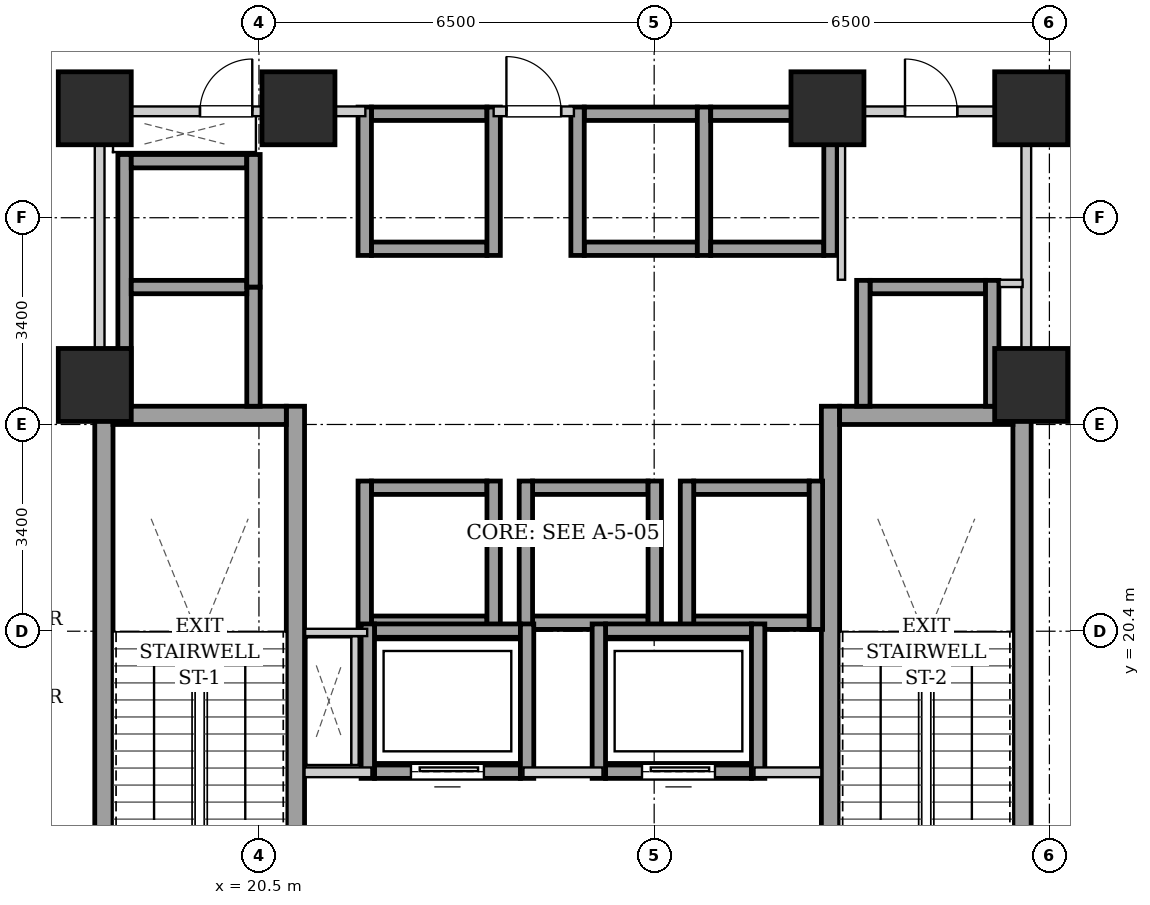
"""IFC4 building model, lengths in metres.
Left out: names, types, materials, properties, quantities, classifications, styles, units other than length and angle.
Written with IfcOpenShell. Run it as: python <this file> out.ifc"""

import sys

from ifc_helpers import new_model, si_unit, direction, frame, frame_2d, origin, origin_2d, place, context, subcontext, project, spatial, rectangle, extrude, element, fill, save


model = new_model("IFC4")
c1 = context("Model", 3, precision=1e-05, world=origin(), true_north=direction((0.0, 1.0)))
c2 = subcontext(c1, "Body", "Model", "MODEL_VIEW")
j1 = project(units=[si_unit("LENGTHUNIT", "METRE"), si_unit("PLANEANGLEUNIT", "RADIAN")], contexts=[c1])
p1 = place(None, origin())
s1 = spatial("IfcSite", under=j1, at=p1, CompositionType="ELEMENT")
p2 = place(p1, origin())
s2 = spatial("IfcBuilding", under=s1, at=p2, CompositionType="ELEMENT")
p3 = place(p2, frame((0.0, 0.0, 20.8)))
s3 = spatial("IfcBuildingStorey", under=s2, at=p3, CompositionType="ELEMENT", Elevation=20.8)
for number, where, z_axis, x_axis in (
    (1, (17.8, 29.0, 0.0), (0.0, 0.0, 1.0), (1.0, 0.0, 0.0)),
    (2, (21.15, 29.0, 0.0), (0.0, 0.0, 1.0), (1.0, 0.0, 0.0)),
    (3, (29.85, 29.0, 0.0), (0.0, 0.0, 1.0), (1.0, 0.0, 0.0)),
    (4, (33.2, 29.0, 0.0), (0.0, 0.0, 1.0), (1.0, 0.0, 0.0)),
    (5, (17.8, 24.45, 0.0), (0.0, 0.0, 1.0), (1.0, 0.0, 0.0)),
    (6, (33.2, 24.45, 0.0), (0.0, 0.0, 1.0), (1.0, 0.0, 0.0)),
):
    element("IfcColumn", number, at=place(p3, frame(where, z_axis=z_axis, x_axis=x_axis)), inside=s3, PredefinedType="COLUMN", context=c2, shape_type="SweptSolid", body=[
        extrude(rectangle(XDim=1.2, YDim=1.2, at=origin_2d()), origin(), (0.0, 0.0, 1.0), 5.0),
    ])
for number, where, z_axis, x_axis in (
    (7, (17.95, 15.1, 0.0), (0.0, 0.0, 1.0), (0.0, 1.0, 0.0)),
    (8, (21.1, 15.1, 0.0), (0.0, 0.0, 1.0), (0.0, 1.0, 0.0)),
):
    element("IfcWall", number, at=place(p3, frame(where, z_axis=z_axis, x_axis=x_axis)), inside=s3, PredefinedType="SHEAR", context=c2, shape_type="SweptSolid", body=[
        extrude(rectangle(XDim=9.0, YDim=0.3, at=frame_2d((4.5, 0.0))), origin(), (0.0, 0.0, 1.0), 4.74),
    ])
p4 = place(p3, frame((18.1, 23.95, 0.0), z_axis=(0.0, 0.0, 1.0), x_axis=(1.0, 0.0, 0.0)))
e9 = element("IfcWall", 9, at=p4, inside=s3, PredefinedType="SHEAR", context=c2, shape_type="SweptSolid", body=[
    extrude(rectangle(XDim=2.85, YDim=0.3, at=frame_2d((1.425, 0.0))), origin(), (0.0, 0.0, 1.0), 4.74),
])
for number, where, z_axis, x_axis in (
    (10, (29.9, 15.1, 0.0), (0.0, 0.0, 1.0), (0.0, 1.0, 0.0)),
    (11, (33.05, 15.1, 0.0), (0.0, 0.0, 1.0), (0.0, 1.0, 0.0)),
):
    element("IfcWall", number, at=place(p3, frame(where, z_axis=z_axis, x_axis=x_axis)), inside=s3, PredefinedType="SHEAR", context=c2, shape_type="SweptSolid", body=[
        extrude(rectangle(XDim=9.0, YDim=0.3, at=frame_2d((4.5, 0.0))), origin(), (0.0, 0.0, 1.0), 4.74),
    ])
p5 = place(p3, frame((30.05, 23.95, 0.0), z_axis=(0.0, 0.0, 1.0), x_axis=(1.0, 0.0, 0.0)))
e12 = element("IfcWall", 12, at=p5, inside=s3, PredefinedType="SHEAR", context=c2, shape_type="SweptSolid", body=[
    extrude(rectangle(XDim=2.85, YDim=0.3, at=frame_2d((1.425, 0.0))), origin(), (0.0, 0.0, 1.0), 4.74),
])
for number, where, z_axis, x_axis in (
    (13, (22.35, 26.69, 0.0), (0.0, 0.0, 1.0), (1.0, 0.0, 0.0)),
    (14, (22.35, 28.91, 0.0), (0.0, 0.0, 1.0), (1.0, 0.0, 0.0)),
):
    element("IfcWall", number, at=place(p3, frame(where, z_axis=z_axis, x_axis=x_axis)), inside=s3, PredefinedType="SHEAR", context=c2, shape_type="SweptSolid", body=[
        extrude(rectangle(XDim=1.9, YDim=0.22, at=frame_2d((0.95, 0.0))), origin(), (0.0, 0.0, 1.0), 4.74),
    ])
for number, where, z_axis, x_axis in (
    (15, (22.24, 26.58, 0.0), (0.0, 0.0, 1.0), (0.0, 1.0, 0.0)),
    (16, (24.36, 26.58, 0.0), (0.0, 0.0, 1.0), (0.0, 1.0, 0.0)),
):
    element("IfcWall", number, at=place(p3, frame(where, z_axis=z_axis, x_axis=x_axis)), inside=s3, PredefinedType="SHEAR", context=c2, shape_type="SweptSolid", body=[
        extrude(rectangle(XDim=2.44, YDim=0.22, at=frame_2d((1.22, 0.0))), origin(), (0.0, 0.0, 1.0), 4.74),
    ])
for number, where, z_axis, x_axis in (
    (17, (25.85, 26.69, 0.0), (0.0, 0.0, 1.0), (1.0, 0.0, 0.0)),
    (18, (25.85, 28.91, 0.0), (0.0, 0.0, 1.0), (1.0, 0.0, 0.0)),
):
    element("IfcWall", number, at=place(p3, frame(where, z_axis=z_axis, x_axis=x_axis)), inside=s3, PredefinedType="SHEAR", context=c2, shape_type="SweptSolid", body=[
        extrude(rectangle(XDim=1.86, YDim=0.22, at=frame_2d((0.93, 0.0))), origin(), (0.0, 0.0, 1.0), 4.74),
    ])
for number, where, z_axis, x_axis in (
    (19, (25.74, 26.58, 0.0), (0.0, 0.0, 1.0), (0.0, 1.0, 0.0)),
    (20, (27.82, 26.58, 0.0), (0.0, 0.0, 1.0), (0.0, 1.0, 0.0)),
):
    element("IfcWall", number, at=place(p3, frame(where, z_axis=z_axis, x_axis=x_axis)), inside=s3, PredefinedType="SHEAR", context=c2, shape_type="SweptSolid", body=[
        extrude(rectangle(XDim=2.44, YDim=0.22, at=frame_2d((1.22, 0.0))), origin(), (0.0, 0.0, 1.0), 4.74),
    ])
for number, where, z_axis, x_axis in (
    (21, (27.93, 26.69, 0.0), (0.0, 0.0, 1.0), (1.0, 0.0, 0.0)),
    (22, (27.93, 28.91, 0.0), (0.0, 0.0, 1.0), (1.0, 0.0, 0.0)),
):
    element("IfcWall", number, at=place(p3, frame(where, z_axis=z_axis, x_axis=x_axis)), inside=s3, PredefinedType="SHEAR", context=c2, shape_type="SweptSolid", body=[
        extrude(rectangle(XDim=1.86, YDim=0.22, at=frame_2d((0.93, 0.0))), origin(), (0.0, 0.0, 1.0), 4.74),
    ])
p6 = place(p3, frame((29.9, 26.58, 0.0), z_axis=(0.0, 0.0, 1.0), x_axis=(0.0, 1.0, 0.0)))
e23 = element("IfcWall", 23, at=p6, inside=s3, PredefinedType="SHEAR", context=c2, shape_type="SweptSolid", body=[
    extrude(rectangle(XDim=2.44, YDim=0.22, at=frame_2d((1.22, 0.0))), origin(), (0.0, 0.0, 1.0), 4.74),
])
for number, where, z_axis, x_axis in (
    (24, (22.35, 20.54, 0.0), (0.0, 0.0, 1.0), (1.0, 0.0, 0.0)),
    (25, (22.35, 22.76, 0.0), (0.0, 0.0, 1.0), (1.0, 0.0, 0.0)),
):
    element("IfcWall", number, at=place(p3, frame(where, z_axis=z_axis, x_axis=x_axis)), inside=s3, PredefinedType="SHEAR", context=c2, shape_type="SweptSolid", body=[
        extrude(rectangle(XDim=1.9, YDim=0.22, at=frame_2d((0.95, 0.0))), origin(), (0.0, 0.0, 1.0), 4.74),
    ])
for number, where, z_axis, x_axis in (
    (26, (22.24, 20.43, 0.0), (0.0, 0.0, 1.0), (0.0, 1.0, 0.0)),
    (27, (24.36, 20.43, 0.0), (0.0, 0.0, 1.0), (0.0, 1.0, 0.0)),
):
    element("IfcWall", number, at=place(p3, frame(where, z_axis=z_axis, x_axis=x_axis)), inside=s3, PredefinedType="SHEAR", context=c2, shape_type="SweptSolid", body=[
        extrude(rectangle(XDim=2.44, YDim=0.22, at=frame_2d((1.22, 0.0))), origin(), (0.0, 0.0, 1.0), 4.74),
    ])
for number, where, z_axis, x_axis in (
    (28, (25.0, 20.54, 0.0), (0.0, 0.0, 1.0), (1.0, 0.0, 0.0)),
    (29, (25.0, 22.76, 0.0), (0.0, 0.0, 1.0), (1.0, 0.0, 0.0)),
):
    element("IfcWall", number, at=place(p3, frame(where, z_axis=z_axis, x_axis=x_axis)), inside=s3, PredefinedType="SHEAR", context=c2, shape_type="SweptSolid", body=[
        extrude(rectangle(XDim=1.9, YDim=0.22, at=frame_2d((0.95, 0.0))), origin(), (0.0, 0.0, 1.0), 4.74),
    ])
for number, where, z_axis, x_axis in (
    (30, (24.89, 20.43, 0.0), (0.0, 0.0, 1.0), (0.0, 1.0, 0.0)),
    (31, (27.01, 20.43, 0.0), (0.0, 0.0, 1.0), (0.0, 1.0, 0.0)),
):
    element("IfcWall", number, at=place(p3, frame(where, z_axis=z_axis, x_axis=x_axis)), inside=s3, PredefinedType="SHEAR", context=c2, shape_type="SweptSolid", body=[
        extrude(rectangle(XDim=2.44, YDim=0.22, at=frame_2d((1.22, 0.0))), origin(), (0.0, 0.0, 1.0), 4.74),
    ])
for number, where, z_axis, x_axis in (
    (32, (27.65, 20.54, 0.0), (0.0, 0.0, 1.0), (1.0, 0.0, 0.0)),
    (33, (27.65, 22.76, 0.0), (0.0, 0.0, 1.0), (1.0, 0.0, 0.0)),
):
    element("IfcWall", number, at=place(p3, frame(where, z_axis=z_axis, x_axis=x_axis)), inside=s3, PredefinedType="SHEAR", context=c2, shape_type="SweptSolid", body=[
        extrude(rectangle(XDim=1.9, YDim=0.22, at=frame_2d((0.95, 0.0))), origin(), (0.0, 0.0, 1.0), 4.74),
    ])
for number, where, z_axis, x_axis in (
    (34, (27.54, 20.43, 0.0), (0.0, 0.0, 1.0), (0.0, 1.0, 0.0)),
    (35, (29.66, 20.43, 0.0), (0.0, 0.0, 1.0), (0.0, 1.0, 0.0)),
):
    element("IfcWall", number, at=place(p3, frame(where, z_axis=z_axis, x_axis=x_axis)), inside=s3, PredefinedType="SHEAR", context=c2, shape_type="SweptSolid", body=[
        extrude(rectangle(XDim=2.44, YDim=0.22, at=frame_2d((1.22, 0.0))), origin(), (0.0, 0.0, 1.0), 4.74),
    ])
p7 = place(p3, frame((18.29, 24.1, 0.0), z_axis=(0.0, 0.0, 1.0), x_axis=(0.0, 1.0, 0.0)))
e36 = element("IfcWall", 36, at=p7, inside=s3, PredefinedType="SHEAR", context=c2, shape_type="SweptSolid", body=[
    extrude(rectangle(XDim=4.14, YDim=0.22, at=frame_2d((2.07, 0.0))), origin(), (0.0, 0.0, 1.0), 4.74),
])
p8 = place(p3, frame((20.41, 24.1, 0.0), z_axis=(0.0, 0.0, 1.0), x_axis=(0.0, 1.0, 0.0)))
e37 = element("IfcWall", 37, at=p8, inside=s3, PredefinedType="SHEAR", context=c2, shape_type="SweptSolid", body=[
    extrude(rectangle(XDim=1.96, YDim=0.22, at=frame_2d((0.98, 0.0))), origin(), (0.0, 0.0, 1.0), 4.74),
])
for number, where, z_axis, x_axis in (
    (38, (18.4, 26.06, 0.0), (0.0, 0.0, 1.0), (1.0, 0.0, 0.0)),
    (39, (18.4, 28.13, 0.0), (0.0, 0.0, 1.0), (1.0, 0.0, 0.0)),
):
    element("IfcWall", number, at=place(p3, frame(where, z_axis=z_axis, x_axis=x_axis)), inside=s3, PredefinedType="SHEAR", context=c2, shape_type="SweptSolid", body=[
        extrude(rectangle(XDim=1.9, YDim=0.22, at=frame_2d((0.95, 0.0))), origin(), (0.0, 0.0, 1.0), 4.74),
    ])
p9 = place(p3, frame((20.41, 26.06, 0.0), z_axis=(0.0, 0.0, 1.0), x_axis=(0.0, 1.0, 0.0)))
e40 = element("IfcWall", 40, at=p9, inside=s3, PredefinedType="SHEAR", context=c2, shape_type="SweptSolid", body=[
    extrude(rectangle(XDim=2.18, YDim=0.22, at=frame_2d((1.09, 0.0))), origin(), (0.0, 0.0, 1.0), 4.74),
])
p10 = place(p3, frame((30.55, 26.06, 0.0), z_axis=(0.0, 0.0, 1.0), x_axis=(1.0, 0.0, 0.0)))
e41 = element("IfcWall", 41, at=p10, inside=s3, PredefinedType="SHEAR", context=c2, shape_type="SweptSolid", body=[
    extrude(rectangle(XDim=1.9, YDim=0.22, at=frame_2d((0.95, 0.0))), origin(), (0.0, 0.0, 1.0), 4.74),
])
for number, where, z_axis, x_axis in (
    (42, (30.44, 24.1, 0.0), (0.0, 0.0, 1.0), (0.0, 1.0, 0.0)),
    (43, (32.56, 24.1, 0.0), (0.0, 0.0, 1.0), (0.0, 1.0, 0.0)),
):
    element("IfcWall", number, at=place(p3, frame(where, z_axis=z_axis, x_axis=x_axis)), inside=s3, PredefinedType="SHEAR", context=c2, shape_type="SweptSolid", body=[
        extrude(rectangle(XDim=2.07, YDim=0.22, at=frame_2d((1.035, 0.0))), origin(), (0.0, 0.0, 1.0), 4.74),
    ])
p11 = place(p3, frame((22.4, 18.09, 0.0), z_axis=(0.0, 0.0, 1.0), x_axis=(1.0, 0.0, 0.0)))
e44 = element("IfcWall", 44, at=p11, inside=s3, PredefinedType="SHEAR", context=c2, shape_type="SweptSolid", body=[
    extrude(rectangle(XDim=2.4, YDim=0.22, at=frame_2d((1.2, 0.0))), origin(), (0.0, 0.0, 1.0), 4.74),
])
p12 = place(p11, frame((0.6, 0.0, 0.0)))
e45 = element("IfcOpeningElement", 45, at=p12, cuts=e44, PredefinedType="OPENING", context=c2, shape_type="SweptSolid", body=[
    extrude(rectangle(XDim=1.2, YDim=2.15, at=frame_2d((0.6, 1.075))), frame((0.0, 0.12, 0.0), z_axis=(0.0, -1.0, 0.0), x_axis=(1.0, 0.0, 0.0)), (0.0, 0.0, 1.0), 0.24),
])
p13 = place(p3, frame((22.4, 20.41, 0.0), z_axis=(0.0, 0.0, 1.0), x_axis=(1.0, 0.0, 0.0)))
e46 = element("IfcWall", 46, at=p13, inside=s3, PredefinedType="SHEAR", context=c2, shape_type="SweptSolid", body=[
    extrude(rectangle(XDim=2.4, YDim=0.22, at=frame_2d((1.2, 0.0))), origin(), (0.0, 0.0, 1.0), 4.74),
])
for number, where, z_axis, x_axis in (
    (47, (22.29, 17.98, 0.0), (0.0, 0.0, 1.0), (0.0, 1.0, 0.0)),
    (48, (24.91, 17.98, 0.0), (0.0, 0.0, 1.0), (0.0, 1.0, 0.0)),
):
    element("IfcWall", number, at=place(p3, frame(where, z_axis=z_axis, x_axis=x_axis)), inside=s3, PredefinedType="SHEAR", context=c2, shape_type="SweptSolid", body=[
        extrude(rectangle(XDim=2.54, YDim=0.22, at=frame_2d((1.27, 0.0))), origin(), (0.0, 0.0, 1.0), 4.74),
    ])
p14 = place(p3, frame((26.2, 18.09, 0.0), z_axis=(0.0, 0.0, 1.0), x_axis=(1.0, 0.0, 0.0)))
e49 = element("IfcWall", 49, at=p14, inside=s3, PredefinedType="SHEAR", context=c2, shape_type="SweptSolid", body=[
    extrude(rectangle(XDim=2.4, YDim=0.22, at=frame_2d((1.2, 0.0))), origin(), (0.0, 0.0, 1.0), 4.74),
])
p15 = place(p14, frame((0.6, 0.0, 0.0)))
e50 = element("IfcOpeningElement", 50, at=p15, cuts=e49, PredefinedType="OPENING", context=c2, shape_type="SweptSolid", body=[
    extrude(rectangle(XDim=1.2, YDim=2.15, at=frame_2d((0.6, 1.075))), frame((0.0, 0.12, 0.0), z_axis=(0.0, -1.0, 0.0), x_axis=(1.0, 0.0, 0.0)), (0.0, 0.0, 1.0), 0.24),
])
p16 = place(p3, frame((26.2, 20.41, 0.0), z_axis=(0.0, 0.0, 1.0), x_axis=(1.0, 0.0, 0.0)))
e51 = element("IfcWall", 51, at=p16, inside=s3, PredefinedType="SHEAR", context=c2, shape_type="SweptSolid", body=[
    extrude(rectangle(XDim=2.4, YDim=0.22, at=frame_2d((1.2, 0.0))), origin(), (0.0, 0.0, 1.0), 4.74),
])
for number, where, z_axis, x_axis in (
    (52, (26.09, 17.98, 0.0), (0.0, 0.0, 1.0), (0.0, 1.0, 0.0)),
    (53, (28.71, 17.98, 0.0), (0.0, 0.0, 1.0), (0.0, 1.0, 0.0)),
):
    element("IfcWall", number, at=place(p3, frame(where, z_axis=z_axis, x_axis=x_axis)), inside=s3, PredefinedType="SHEAR", context=c2, shape_type="SweptSolid", body=[
        extrude(rectangle(XDim=2.54, YDim=0.22, at=frame_2d((1.27, 0.0))), origin(), (0.0, 0.0, 1.0), 4.74),
    ])
p17 = place(p3, frame((21.25, 18.08, 0.0), z_axis=(0.0, 0.0, 1.0), x_axis=(1.0, 0.0, 0.0)))
e54 = element("IfcWall", 54, at=p17, inside=s3, PredefinedType="PARTITIONING", context=c2, shape_type="SweptSolid", body=[
    extrude(rectangle(XDim=1.1, YDim=0.16, at=frame_2d((0.55, 0.0))), origin(), (0.0, 0.0, 1.0), 4.74),
])
p18 = place(p3, frame((24.85, 18.08, 0.0), z_axis=(0.0, 0.0, 1.0), x_axis=(1.0, 0.0, 0.0)))
e55 = element("IfcWall", 55, at=p18, inside=s3, PredefinedType="PARTITIONING", context=c2, shape_type="SweptSolid", body=[
    extrude(rectangle(XDim=1.3, YDim=0.16, at=frame_2d((0.65, 0.0))), origin(), (0.0, 0.0, 1.0), 4.74),
])
p19 = place(p3, frame((28.65, 18.08, 0.0), z_axis=(0.0, 0.0, 1.0), x_axis=(1.0, 0.0, 0.0)))
e56 = element("IfcWall", 56, at=p19, inside=s3, PredefinedType="PARTITIONING", context=c2, shape_type="SweptSolid", body=[
    extrude(rectangle(XDim=1.1, YDim=0.16, at=frame_2d((0.55, 0.0))), origin(), (0.0, 0.0, 1.0), 4.74),
])
for number, where, z_axis, x_axis in (
    (57, (17.88, 24.12, 0.0), (0.0, 0.0, 1.0), (0.0, 1.0, 0.0)),
    (58, (33.12, 24.12, 0.0), (0.0, 0.0, 1.0), (0.0, 1.0, 0.0)),
):
    element("IfcWall", number, at=place(p3, frame(where, z_axis=z_axis, x_axis=x_axis)), inside=s3, PredefinedType="PARTITIONING", context=c2, shape_type="SweptSolid", body=[
        extrude(rectangle(XDim=4.76, YDim=0.16, at=frame_2d((2.38, 0.0))), origin(), (0.0, 0.0, 1.0), 4.74),
    ])
p20 = place(p3, frame((24.36, 28.95, 0.0), z_axis=(0.0, 0.0, 1.0), x_axis=(1.0, 0.0, 0.0)))
e59 = element("IfcWall", 59, at=p20, inside=s3, PredefinedType="PARTITIONING", context=c2, shape_type="SweptSolid", body=[
    extrude(rectangle(XDim=1.32, YDim=0.16, at=frame_2d((0.66, 0.0))), origin(), (0.0, 0.0, 1.0), 4.74),
])
p21 = place(p20, frame((0.21, 0.0, 0.0)))
e60 = element("IfcOpeningElement", 60, at=p21, cuts=e59, PredefinedType="OPENING", context=c2, shape_type="SweptSolid", body=[
    extrude(rectangle(XDim=0.9, YDim=2.05, at=frame_2d((0.45, 1.025))), frame((0.0, 0.09, 0.0), z_axis=(0.0, -1.0, 0.0), x_axis=(1.0, 0.0, 0.0)), (0.0, 0.0, 1.0), 0.18),
])
p22 = place(p3, frame((17.96, 28.95, 0.0), z_axis=(0.0, 0.0, 1.0), x_axis=(1.0, 0.0, 0.0)))
e61 = element("IfcWall", 61, at=p22, inside=s3, PredefinedType="PARTITIONING", context=c2, shape_type="SweptSolid", body=[
    extrude(rectangle(XDim=4.29, YDim=0.16, at=frame_2d((2.145, 0.0))), origin(), (0.0, 0.0, 1.0), 4.74),
])
p23 = place(p22, frame((1.57, 0.0, 0.0)))
e62 = element("IfcOpeningElement", 62, at=p23, cuts=e61, PredefinedType="OPENING", context=c2, shape_type="SweptSolid", body=[
    extrude(rectangle(XDim=0.86, YDim=2.05, at=frame_2d((0.43, 1.025))), frame((0.0, 0.09, 0.0), z_axis=(0.0, -1.0, 0.0), x_axis=(1.0, 0.0, 0.0)), (0.0, 0.0, 1.0), 0.18),
])
p24 = place(p3, frame((22.08, 18.2, 0.0), z_axis=(0.0, 0.0, 1.0), x_axis=(0.0, 1.0, 0.0)))
e63 = element("IfcWall", 63, at=p24, inside=s3, PredefinedType="PARTITIONING", context=c2, shape_type="SweptSolid", body=[
    extrude(rectangle(XDim=2.12, YDim=0.12, at=frame_2d((1.06, 0.0))), origin(), (0.0, 0.0, 1.0), 4.74),
])
p25 = place(p3, frame((22.28, 20.38, 0.0), z_axis=(0.0, 0.0, 1.0), x_axis=(-1.0, 0.0, 0.0)))
e64 = element("IfcWall", 64, at=p25, inside=s3, PredefinedType="PARTITIONING", context=c2, shape_type="SweptSolid", body=[
    extrude(rectangle(XDim=1.02, YDim=0.12, at=frame_2d((0.51, 0.0))), origin(), (0.0, 0.0, 1.0), 4.74),
])
p26 = place(p3, frame((30.08, 26.18, 0.0), z_axis=(0.0, 0.0, 1.0), x_axis=(0.0, 1.0, 0.0)))
e65 = element("IfcWall", 65, at=p26, inside=s3, PredefinedType="PARTITIONING", context=c2, shape_type="SweptSolid", body=[
    extrude(rectangle(XDim=2.68, YDim=0.12, at=frame_2d((1.34, 0.0))), origin(), (0.0, 0.0, 1.0), 4.74),
])
p27 = place(p3, frame((32.68, 26.12, 0.0), z_axis=(0.0, 0.0, 1.0), x_axis=(1.0, 0.0, 0.0)))
e66 = element("IfcWall", 66, at=p27, inside=s3, PredefinedType="PARTITIONING", context=c2, shape_type="SweptSolid", body=[
    extrude(rectangle(XDim=0.38, YDim=0.12, at=frame_2d((0.19, 0.0))), origin(), (0.0, 0.0, 1.0), 4.74),
])
p28 = place(p3, frame((30.08, 28.95, 0.0), z_axis=(0.0, 0.0, 1.0), x_axis=(1.0, 0.0, 0.0)))
e67 = element("IfcWall", 67, at=p28, inside=s3, PredefinedType="PARTITIONING", context=c2, shape_type="SweptSolid", body=[
    extrude(rectangle(XDim=2.96, YDim=0.16, at=frame_2d((1.48, 0.0))), origin(), (0.0, 0.0, 1.0), 4.74),
])
p29 = place(p28, frame((1.045, 0.0, 0.0)))
e68 = element("IfcOpeningElement", 68, at=p29, cuts=e67, PredefinedType="OPENING", context=c2, shape_type="SweptSolid", body=[
    extrude(rectangle(XDim=0.86, YDim=2.05, at=frame_2d((0.43, 1.025))), frame((0.0, 0.09, 0.0), z_axis=(0.0, -1.0, 0.0), x_axis=(1.0, 0.0, 0.0)), (0.0, 0.0, 1.0), 0.18),
])
p30 = place(p12, origin())
e69 = element("IfcDoor", 69, at=p30, inside=s3, OperationType="SLIDING_TO_LEFT", PredefinedType="DOOR", context=c2, shape_type="SweptSolid", body=[
    extrude(rectangle(XDim=1.2, YDim=2.15, at=frame_2d((0.6, 1.075))), frame((0.0, 0.025, 0.0), z_axis=(0.0, -1.0, 0.0), x_axis=(1.0, 0.0, 0.0)), (0.0, 0.0, 1.0), 0.05),
])
fill(e45, e69)
p31 = place(p15, origin())
e70 = element("IfcDoor", 70, at=p31, inside=s3, OperationType="SLIDING_TO_LEFT", PredefinedType="DOOR", context=c2, shape_type="SweptSolid", body=[
    extrude(rectangle(XDim=1.2, YDim=2.15, at=frame_2d((0.6, 1.075))), frame((0.0, 0.025, 0.0), z_axis=(0.0, -1.0, 0.0), x_axis=(1.0, 0.0, 0.0)), (0.0, 0.0, 1.0), 0.05),
])
fill(e50, e70)
p32 = place(p21, origin())
e71 = element("IfcDoor", 71, at=p32, inside=s3, OperationType="SINGLE_SWING_LEFT", PredefinedType="DOOR", context=c2, shape_type="SweptSolid", body=[
    extrude(rectangle(XDim=0.9, YDim=2.05, at=frame_2d((0.45, 1.025))), frame((0.0, 0.025, 0.0), z_axis=(0.0, -1.0, 0.0), x_axis=(1.0, 0.0, 0.0)), (0.0, 0.0, 1.0), 0.05),
])
fill(e60, e71)
p33 = place(p23, origin())
e72 = element("IfcDoor", 72, at=p33, inside=s3, OperationType="SINGLE_SWING_RIGHT", PredefinedType="DOOR", context=c2, shape_type="SweptSolid", body=[
    extrude(rectangle(XDim=0.86, YDim=2.05, at=frame_2d((0.43, 1.025))), frame((0.0, 0.025, 0.0), z_axis=(0.0, -1.0, 0.0), x_axis=(1.0, 0.0, 0.0)), (0.0, 0.0, 1.0), 0.05),
])
fill(e62, e72)
p34 = place(p29, origin())
e73 = element("IfcDoor", 73, at=p34, inside=s3, OperationType="SINGLE_SWING_LEFT", PredefinedType="DOOR", context=c2, shape_type="SweptSolid", body=[
    extrude(rectangle(XDim=0.86, YDim=2.05, at=frame_2d((0.43, 1.025))), frame((0.0, 0.025, 0.0), z_axis=(0.0, -1.0, 0.0), x_axis=(1.0, 0.0, 0.0)), (0.0, 0.0, 1.0), 0.05),
])
fill(e68, e73)
save(model, sys.argv[1])
